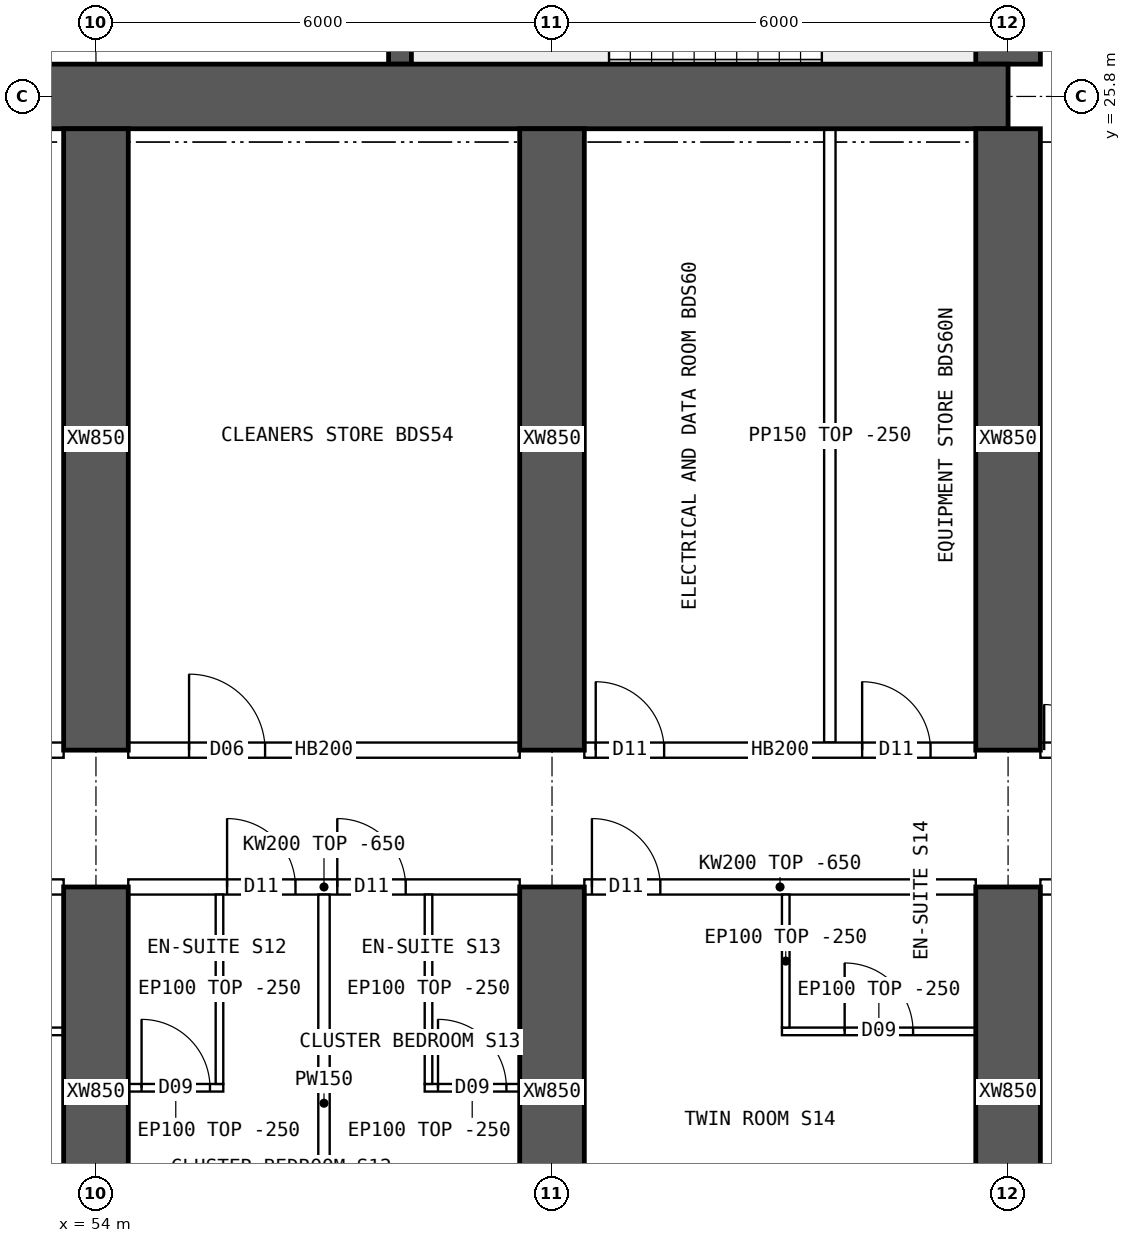
"""IFC4 building model, lengths in metres.
Left out: names, types, materials, properties, quantities, classifications, styles, units other than length and angle.
Written with IfcOpenShell. Run it as: python <this file> out.ifc"""

import sys

from ifc_helpers import new_model, si_unit, direction, frame, frame_2d, origin, place, context, subcontext, project, spatial, polyline, rectangle, outline, extrude, element, fill, save


model = new_model("IFC4")
c1 = context("Model", 3, precision=1e-05, world=origin(), true_north=direction((0.0, 1.0)))
c2 = subcontext(c1, "Body", "Model", "MODEL_VIEW")
j1 = project(units=[si_unit("LENGTHUNIT", "METRE"), si_unit("PLANEANGLEUNIT", "RADIAN")], contexts=[c1])
p1 = place(None, origin())
s1 = spatial("IfcSite", under=j1, at=p1, CompositionType="ELEMENT")
p2 = place(p1, origin())
s2 = spatial("IfcBuilding", under=s1, at=p2, CompositionType="ELEMENT")
p3 = place(p2, frame((0.0, 0.0, 193.6)))
s3 = spatial("IfcBuildingStorey", under=s2, at=p3, CompositionType="ELEMENT", Elevation=193.6)
p4 = place(p3, frame((18.0, 25.8, 0.0), z_axis=(0.0, 0.0, 1.0), x_axis=(1.0, 0.0, 0.0)))
e1 = element("IfcWall", 1, at=p4, inside=s3, PredefinedType="SHEAR", context=c2, shape_type="SweptSolid", body=[
    extrude(rectangle(XDim=48.0, YDim=0.85, at=frame_2d((24.0, 0.0))), origin(), (0.0, 0.0, 1.0), 3.75),
])
p5 = place(p3, frame((66.0, 26.225, 0.0), z_axis=(0.0, 0.0, 1.0), x_axis=(0.0, 1.0, 0.0)))
e2 = element("IfcWall", 2, at=p5, inside=s3, PredefinedType="SHEAR", context=c2, shape_type="SweptSolid", body=[
    extrude(rectangle(XDim=11.55, YDim=0.85, at=frame_2d((5.775, 0.0))), origin(), (0.0, 0.0, 1.0), 3.75),
])
p6 = place(p5, frame((5.075, 0.0, 0.0)))
e3 = element("IfcOpeningElement", 3, at=p6, cuts=e2, PredefinedType="OPENING", context=c2, shape_type="SweptSolid", body=[
    extrude(rectangle(XDim=1.2, YDim=2.1, at=frame_2d((0.6, 1.05))), frame((0.0, 0.435, 0.0), z_axis=(0.0, -1.0, 0.0), x_axis=(1.0, 0.0, 0.0)), (0.0, 0.0, 1.0), 0.87),
])
p7 = place(p3, frame((58.0, 26.225, 0.0), z_axis=(0.0, 0.0, 1.0), x_axis=(0.0, 1.0, 0.0)))
e4 = element("IfcWall", 4, at=p7, inside=s3, PredefinedType="SHEAR", context=c2, shape_type="SweptSolid", body=[
    extrude(rectangle(XDim=4.025, YDim=0.3, at=frame_2d((2.012, 0.0))), origin(), (0.0, 0.0, 1.0), 3.75),
])
p8 = place(p3, frame((54.0, 10.0, 0.0), z_axis=(0.0, 0.0, 1.0), x_axis=(0.0, 1.0, 0.0)))
e5 = element("IfcWall", 5, at=p8, inside=s3, PredefinedType="SHEAR", context=c2, shape_type="SweptSolid", body=[
    extrude(rectangle(XDim=5.4, YDim=0.85, at=frame_2d((2.7, 0.0))), origin(), (0.0, 0.0, 1.0), 3.75),
])
p9 = place(p3, frame((54.0, 17.2, 0.0), z_axis=(0.0, 0.0, 1.0), x_axis=(0.0, 1.0, 0.0)))
e6 = element("IfcWall", 6, at=p9, inside=s3, PredefinedType="SHEAR", context=c2, shape_type="SweptSolid", body=[
    extrude(rectangle(XDim=8.175, YDim=0.85, at=frame_2d((4.087, 0.0))), origin(), (0.0, 0.0, 1.0), 3.75),
])
p10 = place(p3, frame((60.0, 10.0, 0.0), z_axis=(0.0, 0.0, 1.0), x_axis=(0.0, 1.0, 0.0)))
e7 = element("IfcWall", 7, at=p10, inside=s3, PredefinedType="SHEAR", context=c2, shape_type="SweptSolid", body=[
    extrude(rectangle(XDim=5.4, YDim=0.85, at=frame_2d((2.7, 0.0))), origin(), (0.0, 0.0, 1.0), 3.75),
])
p11 = place(p3, frame((60.0, 17.2, 0.0), z_axis=(0.0, 0.0, 1.0), x_axis=(0.0, 1.0, 0.0)))
e8 = element("IfcWall", 8, at=p11, inside=s3, PredefinedType="SHEAR", context=c2, shape_type="SweptSolid", body=[
    extrude(rectangle(XDim=8.175, YDim=0.85, at=frame_2d((4.087, 0.0))), origin(), (0.0, 0.0, 1.0), 3.75),
])
p12 = place(p3, frame((66.0, 10.0, 0.0), z_axis=(0.0, 0.0, 1.0), x_axis=(0.0, 1.0, 0.0)))
e9 = element("IfcWall", 9, at=p12, inside=s3, PredefinedType="SHEAR", context=c2, shape_type="SweptSolid", body=[
    extrude(rectangle(XDim=5.4, YDim=0.85, at=frame_2d((2.7, 0.0))), origin(), (0.0, 0.0, 1.0), 3.75),
])
p13 = place(p3, frame((66.0, 17.2, 0.0), z_axis=(0.0, 0.0, 1.0), x_axis=(0.0, 1.0, 0.0)))
e10 = element("IfcWall", 10, at=p13, inside=s3, PredefinedType="SHEAR", context=c2, shape_type="SweptSolid", body=[
    extrude(rectangle(XDim=8.175, YDim=0.85, at=frame_2d((4.087, 0.0))), origin(), (0.0, 0.0, 1.0), 3.75),
])
p14 = place(p3, frame((48.425, 15.4, 0.0), z_axis=(0.0, 0.0, 1.0), x_axis=(1.0, 0.0, 0.0)))
e11 = element("IfcWall", 11, at=p14, inside=s3, PredefinedType="SOLIDWALL", context=c2, shape_type="SweptSolid", body=[
    extrude(outline(polyline([(0.0, 0.0), (5.15, 0.0), (5.15, 3.1), (0.0, 3.1), (0.0, 0.0)])), frame((0.0, 0.1, 0.0), z_axis=(0.0, -1.0, 0.0), x_axis=(1.0, 0.0, 0.0)), (0.0, 0.0, 1.0), 0.2),
])
p15 = place(p14, frame((0.1, 0.0, 0.0)))
e12 = element("IfcOpeningElement", 12, at=p15, cuts=e11, PredefinedType="OPENING", context=c2, shape_type="SweptSolid", body=[
    extrude(rectangle(XDim=0.9, YDim=2.1, at=frame_2d((0.45, 1.05))), frame((0.0, 0.11, 0.0), z_axis=(0.0, -1.0, 0.0), x_axis=(1.0, 0.0, 0.0)), (0.0, 0.0, 1.0), 0.22),
])
p16 = place(p3, frame((48.425, 17.2, 0.0), z_axis=(0.0, 0.0, 1.0), x_axis=(1.0, 0.0, 0.0)))
e13 = element("IfcWall", 13, at=p16, inside=s3, PredefinedType="SOLIDWALL", context=c2, shape_type="SweptSolid", body=[
    extrude(rectangle(XDim=5.15, YDim=0.2, at=frame_2d((2.575, 0.0))), origin(), (0.0, 0.0, 1.0), 3.5),
])
p17 = place(p16, frame((0.15, 0.0, 0.0)))
e14 = element("IfcOpeningElement", 14, at=p17, cuts=e13, PredefinedType="OPENING", context=c2, shape_type="SweptSolid", body=[
    extrude(rectangle(XDim=0.9, YDim=2.1, at=frame_2d((0.45, 1.05))), frame((0.0, 0.11, 0.0), z_axis=(0.0, -1.0, 0.0), x_axis=(1.0, 0.0, 0.0)), (0.0, 0.0, 1.0), 0.22),
])
p18 = place(p16, frame((2.305, 0.0, 0.0)))
e15 = element("IfcOpeningElement", 15, at=p18, cuts=e13, PredefinedType="OPENING", context=c2, shape_type="SweptSolid", body=[
    extrude(rectangle(XDim=0.9, YDim=2.1, at=frame_2d((0.45, 1.05))), frame((0.0, 0.11, 0.0), z_axis=(0.0, -1.0, 0.0), x_axis=(1.0, 0.0, 0.0)), (0.0, 0.0, 1.0), 0.22),
])
p19 = place(p3, frame((54.425, 15.4, 0.0), z_axis=(0.0, 0.0, 1.0), x_axis=(1.0, 0.0, 0.0)))
e16 = element("IfcWall", 16, at=p19, inside=s3, PredefinedType="SOLIDWALL", context=c2, shape_type="SweptSolid", body=[
    extrude(outline(polyline([(0.0, 0.0), (5.15, 0.0), (5.15, 3.1), (0.0, 3.1), (0.0, 0.0)])), frame((0.0, 0.1, 0.0), z_axis=(0.0, -1.0, 0.0), x_axis=(1.0, 0.0, 0.0)), (0.0, 0.0, 1.0), 0.2),
])
p20 = place(p19, frame((1.3, 0.0, 0.0)))
e17 = element("IfcOpeningElement", 17, at=p20, cuts=e16, PredefinedType="OPENING", context=c2, shape_type="SweptSolid", body=[
    extrude(rectangle(XDim=0.9, YDim=2.1, at=frame_2d((0.45, 1.05))), frame((0.0, 0.11, 0.0), z_axis=(0.0, -1.0, 0.0), x_axis=(1.0, 0.0, 0.0)), (0.0, 0.0, 1.0), 0.22),
])
p21 = place(p19, frame((2.75, 0.0, 0.0)))
e18 = element("IfcOpeningElement", 18, at=p21, cuts=e16, PredefinedType="OPENING", context=c2, shape_type="SweptSolid", body=[
    extrude(rectangle(XDim=0.9, YDim=2.1, at=frame_2d((0.45, 1.05))), frame((0.0, 0.11, 0.0), z_axis=(0.0, -1.0, 0.0), x_axis=(1.0, 0.0, 0.0)), (0.0, 0.0, 1.0), 0.22),
])
p22 = place(p3, frame((54.425, 17.2, 0.0), z_axis=(0.0, 0.0, 1.0), x_axis=(1.0, 0.0, 0.0)))
e19 = element("IfcWall", 19, at=p22, inside=s3, PredefinedType="SOLIDWALL", context=c2, shape_type="SweptSolid", body=[
    extrude(rectangle(XDim=5.15, YDim=0.2, at=frame_2d((2.575, 0.0))), origin(), (0.0, 0.0, 1.0), 3.5),
])
p23 = place(p22, frame((0.8, 0.0, 0.0)))
e20 = element("IfcOpeningElement", 20, at=p23, cuts=e19, PredefinedType="OPENING", context=c2, shape_type="SweptSolid", body=[
    extrude(rectangle(XDim=1.0, YDim=2.1, at=frame_2d((0.5, 1.05))), frame((0.0, 0.11, 0.0), z_axis=(0.0, -1.0, 0.0), x_axis=(1.0, 0.0, 0.0)), (0.0, 0.0, 1.0), 0.22),
])
p24 = place(p3, frame((60.425, 15.4, 0.0), z_axis=(0.0, 0.0, 1.0), x_axis=(1.0, 0.0, 0.0)))
e21 = element("IfcWall", 21, at=p24, inside=s3, PredefinedType="SOLIDWALL", context=c2, shape_type="SweptSolid", body=[
    extrude(outline(polyline([(0.0, 0.0), (5.15, 0.0), (5.15, 3.1), (0.0, 3.1), (0.0, 0.0)])), frame((0.0, 0.1, 0.0), z_axis=(0.0, -1.0, 0.0), x_axis=(1.0, 0.0, 0.0)), (0.0, 0.0, 1.0), 0.2),
])
p25 = place(p24, frame((0.1, 0.0, 0.0)))
e22 = element("IfcOpeningElement", 22, at=p25, cuts=e21, PredefinedType="OPENING", context=c2, shape_type="SweptSolid", body=[
    extrude(rectangle(XDim=0.9, YDim=2.1, at=frame_2d((0.45, 1.05))), frame((0.0, 0.11, 0.0), z_axis=(0.0, -1.0, 0.0), x_axis=(1.0, 0.0, 0.0)), (0.0, 0.0, 1.0), 0.22),
])
p26 = place(p3, frame((60.425, 17.2, 0.0), z_axis=(0.0, 0.0, 1.0), x_axis=(1.0, 0.0, 0.0)))
e23 = element("IfcWall", 23, at=p26, inside=s3, PredefinedType="SOLIDWALL", context=c2, shape_type="SweptSolid", body=[
    extrude(rectangle(XDim=5.15, YDim=0.2, at=frame_2d((2.575, 0.0))), origin(), (0.0, 0.0, 1.0), 3.5),
])
p27 = place(p26, frame((0.15, 0.0, 0.0)))
e24 = element("IfcOpeningElement", 24, at=p27, cuts=e23, PredefinedType="OPENING", context=c2, shape_type="SweptSolid", body=[
    extrude(rectangle(XDim=0.9, YDim=2.1, at=frame_2d((0.45, 1.05))), frame((0.0, 0.11, 0.0), z_axis=(0.0, -1.0, 0.0), x_axis=(1.0, 0.0, 0.0)), (0.0, 0.0, 1.0), 0.22),
])
p28 = place(p26, frame((3.655, 0.0, 0.0)))
e25 = element("IfcOpeningElement", 25, at=p28, cuts=e23, PredefinedType="OPENING", context=c2, shape_type="SweptSolid", body=[
    extrude(rectangle(XDim=0.9, YDim=2.1, at=frame_2d((0.45, 1.05))), frame((0.0, 0.11, 0.0), z_axis=(0.0, -1.0, 0.0), x_axis=(1.0, 0.0, 0.0)), (0.0, 0.0, 1.0), 0.22),
])
p29 = place(p3, frame((66.425, 15.4, 0.0), z_axis=(0.0, 0.0, 1.0), x_axis=(1.0, 0.0, 0.0)))
e26 = element("IfcWall", 26, at=p29, inside=s3, PredefinedType="SOLIDWALL", context=c2, shape_type="SweptSolid", body=[
    extrude(rectangle(XDim=1.975, YDim=0.2, at=frame_2d((0.987, 0.0))), origin(), (0.0, 0.0, 1.0), 3.5),
])
p30 = place(p29, frame((0.2, 0.0, 0.0)))
e27 = element("IfcOpeningElement", 27, at=p30, cuts=e26, PredefinedType="OPENING", context=c2, shape_type="SweptSolid", body=[
    extrude(rectangle(XDim=0.9, YDim=2.1, at=frame_2d((0.45, 1.05))), frame((0.0, 0.11, 0.0), z_axis=(0.0, -1.0, 0.0), x_axis=(1.0, 0.0, 0.0)), (0.0, 0.0, 1.0), 0.22),
])
p31 = place(p3, frame((66.425, 17.2, 0.0), z_axis=(0.0, 0.0, 1.0), x_axis=(1.0, 0.0, 0.0)))
e28 = element("IfcWall", 28, at=p31, inside=s3, PredefinedType="SOLIDWALL", context=c2, shape_type="SweptSolid", body=[
    extrude(rectangle(XDim=1.975, YDim=0.2, at=frame_2d((0.987, 0.0))), origin(), (0.0, 0.0, 1.0), 3.5),
])
p32 = place(p31, frame((0.05, 0.0, 0.0)))
e29 = element("IfcOpeningElement", 29, at=p32, cuts=e28, PredefinedType="OPENING", context=c2, shape_type="SweptSolid", body=[
    extrude(rectangle(XDim=1.2, YDim=2.1, at=frame_2d((0.6, 1.05))), frame((0.0, 0.11, 0.0), z_axis=(0.0, -1.0, 0.0), x_axis=(1.0, 0.0, 0.0)), (0.0, 0.0, 1.0), 0.22),
])
p33 = place(p3, frame((53.575, 13.5, 0.0), z_axis=(0.0, 0.0, 1.0), x_axis=(-1.0, 0.0, 0.0)))
e30 = element("IfcWall", 30, at=p33, inside=s3, PredefinedType="PARTITIONING", context=c2, shape_type="SweptSolid", body=[
    extrude(rectangle(XDim=2.55, YDim=0.1, at=frame_2d((1.275, 0.0))), origin(), (0.0, 0.0, 1.0), 3.5),
])
p34 = place(p33, frame((0.825, 0.0, 0.0)))
e31 = element("IfcOpeningElement", 31, at=p34, cuts=e30, PredefinedType="OPENING", context=c2, shape_type="SweptSolid", body=[
    extrude(rectangle(XDim=0.9, YDim=2.1, at=frame_2d((0.45, 1.05))), frame((0.0, 0.06, 0.0), z_axis=(0.0, -1.0, 0.0), x_axis=(1.0, 0.0, 0.0)), (0.0, 0.0, 1.0), 0.12),
])
p35 = place(p3, frame((57.0, 9.81, 0.0), z_axis=(0.0, 0.0, 1.0), x_axis=(0.0, 1.0, 0.0)))
e32 = element("IfcWall", 32, at=p35, inside=s3, PredefinedType="PARTITIONING", context=c2, shape_type="SweptSolid", body=[
    extrude(outline(polyline([(0.0, 0.0), (5.49, 0.0), (5.49, 3.1), (5.442, 3.1), (5.44, 3.5), (0.792, 3.5), (0.79, 3.1), (0.392, 3.1), (0.39, 3.5), (0.0, 3.5), (0.0, 0.0)])), frame((0.0, 0.075, 0.0), z_axis=(0.0, -1.0, 0.0), x_axis=(1.0, 0.0, 0.0)), (0.0, 0.0, 1.0), 0.15),
])
p36 = place(p3, frame((55.675, 12.758, 0.0), z_axis=(0.0, 0.0, 1.0), x_axis=(-1.0, 0.0, 0.0)))
e33 = element("IfcWall", 33, at=p36, inside=s3, PredefinedType="PARTITIONING", context=c2, shape_type="SweptSolid", body=[
    extrude(rectangle(XDim=1.25, YDim=0.1, at=frame_2d((0.625, 0.0))), origin(), (0.0, 0.0, 1.0), 3.5),
])
p37 = place(p36, frame((0.175, 0.0, 0.0)))
e34 = element("IfcOpeningElement", 34, at=p37, cuts=e33, PredefinedType="OPENING", context=c2, shape_type="SweptSolid", body=[
    extrude(rectangle(XDim=0.9, YDim=2.1, at=frame_2d((0.45, 1.05))), frame((0.0, 0.06, 0.0), z_axis=(0.0, -1.0, 0.0), x_axis=(1.0, 0.0, 0.0)), (0.0, 0.0, 1.0), 0.12),
])
p38 = place(p3, frame((55.625, 12.808, 0.0), z_axis=(0.0, 0.0, 1.0), x_axis=(0.0, 1.0, 0.0)))
e35 = element("IfcWall", 35, at=p38, inside=s3, PredefinedType="PARTITIONING", context=c2, shape_type="SweptSolid", body=[
    extrude(outline(polyline([(0.0, 0.0), (2.492, 0.0), (2.492, 3.1), (2.444, 3.1), (2.442, 3.5), (0.0, 3.5), (0.0, 0.0)])), frame((0.0, 0.05, 0.0), z_axis=(0.0, -1.0, 0.0), x_axis=(1.0, 0.0, 0.0)), (0.0, 0.0, 1.0), 0.1),
])
p39 = place(p3, frame((59.575, 12.758, 0.0), z_axis=(0.0, 0.0, 1.0), x_axis=(-1.0, 0.0, 0.0)))
e36 = element("IfcWall", 36, at=p39, inside=s3, PredefinedType="PARTITIONING", context=c2, shape_type="SweptSolid", body=[
    extrude(rectangle(XDim=1.25, YDim=0.1, at=frame_2d((0.625, 0.0))), origin(), (0.0, 0.0, 1.0), 3.5),
])
p40 = place(p39, frame((0.175, 0.0, 0.0)))
e37 = element("IfcOpeningElement", 37, at=p40, cuts=e36, PredefinedType="OPENING", context=c2, shape_type="SweptSolid", body=[
    extrude(rectangle(XDim=0.9, YDim=2.1, at=frame_2d((0.45, 1.05))), frame((0.0, 0.06, 0.0), z_axis=(0.0, -1.0, 0.0), x_axis=(1.0, 0.0, 0.0)), (0.0, 0.0, 1.0), 0.12),
])
p41 = place(p3, frame((58.375, 12.808, 0.0), z_axis=(0.0, 0.0, 1.0), x_axis=(0.0, 1.0, 0.0)))
e38 = element("IfcWall", 38, at=p41, inside=s3, PredefinedType="PARTITIONING", context=c2, shape_type="SweptSolid", body=[
    extrude(outline(polyline([(0.0, 0.0), (2.492, 0.0), (2.492, 3.1), (2.444, 3.1), (2.442, 3.5), (0.0, 3.5), (0.0, 0.0)])), frame((0.0, 0.05, 0.0), z_axis=(0.0, -1.0, 0.0), x_axis=(1.0, 0.0, 0.0)), (0.0, 0.0, 1.0), 0.1),
])
p42 = place(p3, frame((65.575, 13.5, 0.0), z_axis=(0.0, 0.0, 1.0), x_axis=(-1.0, 0.0, 0.0)))
e39 = element("IfcWall", 39, at=p42, inside=s3, PredefinedType="PARTITIONING", context=c2, shape_type="SweptSolid", body=[
    extrude(rectangle(XDim=2.55, YDim=0.1, at=frame_2d((1.275, 0.0))), origin(), (0.0, 0.0, 1.0), 3.5),
])
p43 = place(p42, frame((0.825, 0.0, 0.0)))
e40 = element("IfcOpeningElement", 40, at=p43, cuts=e39, PredefinedType="OPENING", context=c2, shape_type="SweptSolid", body=[
    extrude(rectangle(XDim=0.9, YDim=2.1, at=frame_2d((0.45, 1.05))), frame((0.0, 0.06, 0.0), z_axis=(0.0, -1.0, 0.0), x_axis=(1.0, 0.0, 0.0)), (0.0, 0.0, 1.0), 0.12),
])
p44 = place(p3, frame((63.075, 13.55, 0.0), z_axis=(0.0, 0.0, 1.0), x_axis=(0.0, 1.0, 0.0)))
e41 = element("IfcWall", 41, at=p44, inside=s3, PredefinedType="PARTITIONING", context=c2, shape_type="SweptSolid", body=[
    extrude(outline(polyline([(0.0, 0.0), (1.75, 0.0), (1.75, 3.1), (1.702, 3.1), (1.7, 3.5), (0.0, 3.5), (0.0, 0.0)])), frame((0.0, 0.05, 0.0), z_axis=(0.0, -1.0, 0.0), x_axis=(1.0, 0.0, 0.0)), (0.0, 0.0, 1.0), 0.1),
])
p45 = place(p3, frame((63.655, 17.3, 0.0), z_axis=(0.0, 0.0, 1.0), x_axis=(0.0, 1.0, 0.0)))
e42 = element("IfcWall", 42, at=p45, inside=s3, PredefinedType="PARTITIONING", context=c2, shape_type="SweptSolid", body=[
    extrude(rectangle(XDim=8.075, YDim=0.15, at=frame_2d((4.038, 0.0))), origin(), (0.0, 0.0, 1.0), 3.5),
])
p46 = place(p32, origin())
e43 = element("IfcDoor", 43, at=p46, inside=s3, OperationType="DOUBLE_DOOR_SINGLE_SWING", PredefinedType="DOOR", context=c2, shape_type="SweptSolid", body=[
    extrude(rectangle(XDim=1.2, YDim=2.1, at=frame_2d((0.6, 1.05))), frame((0.0, 0.025, 0.0), z_axis=(0.0, -1.0, 0.0), x_axis=(1.0, 0.0, 0.0)), (0.0, 0.0, 1.0), 0.05),
])
fill(e29, e43)
p47 = place(p37, origin())
e44 = element("IfcDoor", 44, at=p47, inside=s3, OperationType="SINGLE_SWING_RIGHT", PredefinedType="DOOR", context=c2, shape_type="SweptSolid", body=[
    extrude(rectangle(XDim=0.9, YDim=2.1, at=frame_2d((0.45, 1.05))), frame((0.0, 0.025, 0.0), z_axis=(0.0, -1.0, 0.0), x_axis=(1.0, 0.0, 0.0)), (0.0, 0.0, 1.0), 0.05),
])
fill(e34, e44)
p48 = place(p20, origin())
e45 = element("IfcDoor", 45, at=p48, inside=s3, OperationType="SINGLE_SWING_LEFT", PredefinedType="DOOR", context=c2, shape_type="SweptSolid", body=[
    extrude(rectangle(XDim=0.9, YDim=2.1, at=frame_2d((0.45, 1.05))), frame((0.0, 0.025, 0.0), z_axis=(0.0, -1.0, 0.0), x_axis=(1.0, 0.0, 0.0)), (0.0, 0.0, 1.0), 0.05),
])
fill(e17, e45)
p49 = place(p40, origin())
e46 = element("IfcDoor", 46, at=p49, inside=s3, OperationType="SINGLE_SWING_RIGHT", PredefinedType="DOOR", context=c2, shape_type="SweptSolid", body=[
    extrude(rectangle(XDim=0.9, YDim=2.1, at=frame_2d((0.45, 1.05))), frame((0.0, 0.025, 0.0), z_axis=(0.0, -1.0, 0.0), x_axis=(1.0, 0.0, 0.0)), (0.0, 0.0, 1.0), 0.05),
])
fill(e37, e46)
p50 = place(p21, origin())
e47 = element("IfcDoor", 47, at=p50, inside=s3, OperationType="SINGLE_SWING_LEFT", PredefinedType="DOOR", context=c2, shape_type="SweptSolid", body=[
    extrude(rectangle(XDim=0.9, YDim=2.1, at=frame_2d((0.45, 1.05))), frame((0.0, 0.025, 0.0), z_axis=(0.0, -1.0, 0.0), x_axis=(1.0, 0.0, 0.0)), (0.0, 0.0, 1.0), 0.05),
])
fill(e18, e47)
p51 = place(p43, origin())
e48 = element("IfcDoor", 48, at=p51, inside=s3, OperationType="SINGLE_SWING_RIGHT", PredefinedType="DOOR", context=c2, shape_type="SweptSolid", body=[
    extrude(rectangle(XDim=0.9, YDim=2.1, at=frame_2d((0.45, 1.05))), frame((0.0, 0.025, 0.0), z_axis=(0.0, -1.0, 0.0), x_axis=(1.0, 0.0, 0.0)), (0.0, 0.0, 1.0), 0.05),
])
fill(e40, e48)
p52 = place(p25, origin())
e49 = element("IfcDoor", 49, at=p52, inside=s3, OperationType="SINGLE_SWING_LEFT", PredefinedType="DOOR", context=c2, shape_type="SweptSolid", body=[
    extrude(rectangle(XDim=0.9, YDim=2.1, at=frame_2d((0.45, 1.05))), frame((0.0, 0.025, 0.0), z_axis=(0.0, -1.0, 0.0), x_axis=(1.0, 0.0, 0.0)), (0.0, 0.0, 1.0), 0.05),
])
fill(e22, e49)
p53 = place(p23, origin())
e50 = element("IfcDoor", 50, at=p53, inside=s3, OperationType="SINGLE_SWING_LEFT", PredefinedType="DOOR", context=c2, shape_type="SweptSolid", body=[
    extrude(rectangle(XDim=1.0, YDim=2.1, at=frame_2d((0.5, 1.05))), frame((0.0, 0.025, 0.0), z_axis=(0.0, -1.0, 0.0), x_axis=(1.0, 0.0, 0.0)), (0.0, 0.0, 1.0), 0.05),
])
fill(e20, e50)
p54 = place(p27, origin())
e51 = element("IfcDoor", 51, at=p54, inside=s3, OperationType="SINGLE_SWING_LEFT", PredefinedType="DOOR", context=c2, shape_type="SweptSolid", body=[
    extrude(rectangle(XDim=0.9, YDim=2.1, at=frame_2d((0.45, 1.05))), frame((0.0, 0.025, 0.0), z_axis=(0.0, -1.0, 0.0), x_axis=(1.0, 0.0, 0.0)), (0.0, 0.0, 1.0), 0.05),
])
fill(e24, e51)
p55 = place(p28, origin())
e52 = element("IfcDoor", 52, at=p55, inside=s3, OperationType="SINGLE_SWING_LEFT", PredefinedType="DOOR", context=c2, shape_type="SweptSolid", body=[
    extrude(rectangle(XDim=0.9, YDim=2.1, at=frame_2d((0.45, 1.05))), frame((0.0, 0.025, 0.0), z_axis=(0.0, -1.0, 0.0), x_axis=(1.0, 0.0, 0.0)), (0.0, 0.0, 1.0), 0.05),
])
fill(e25, e52)
save(model, sys.argv[1])
